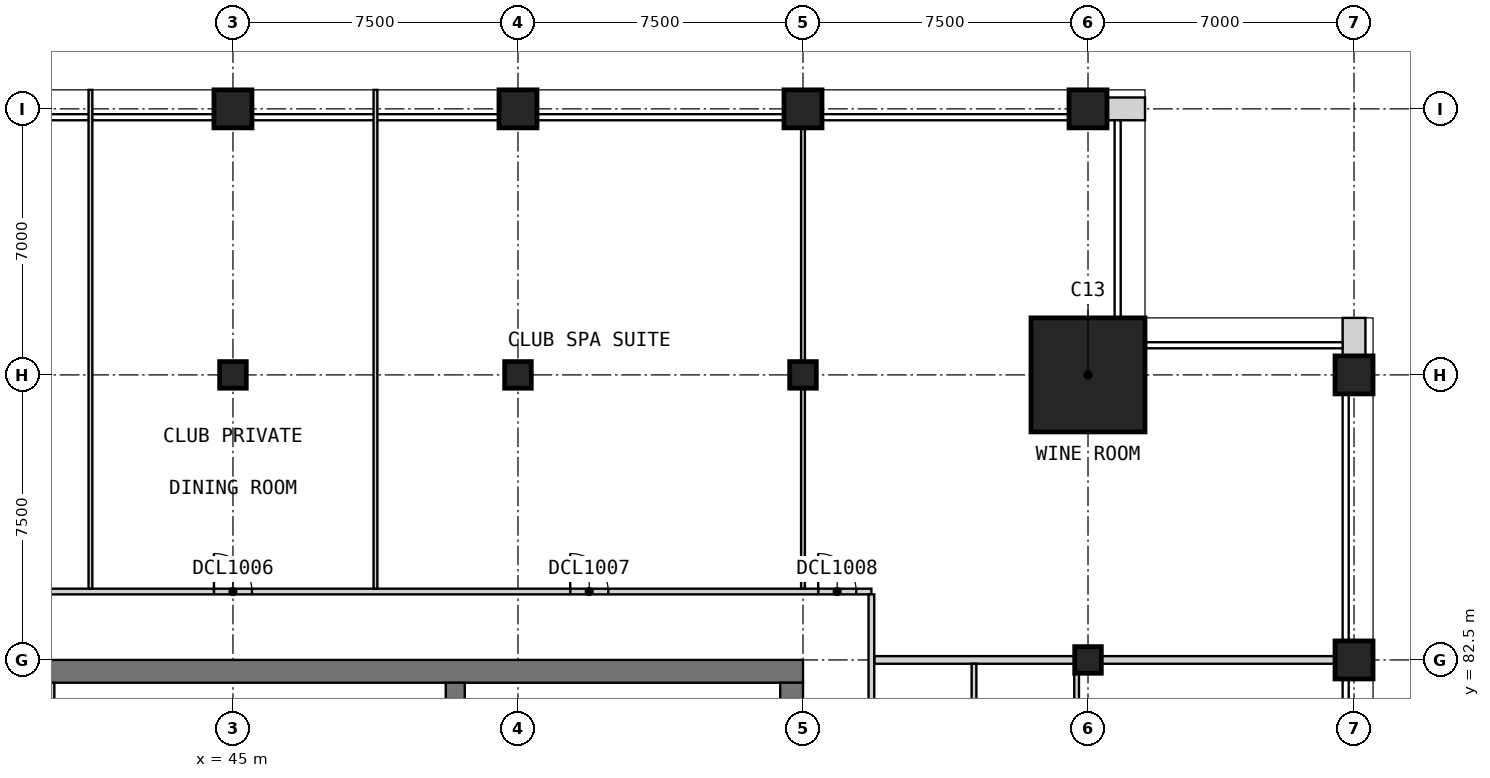
"""IFC4 building model, lengths in metres.
Left out: names, types, materials, properties, quantities, classifications, styles, units other than length and angle.
Written with IfcOpenShell. Run it as: python <this file> out.ifc"""

import sys

from ifc_helpers import new_model, si_unit, direction, frame, frame_2d, origin, origin_2d, place, context, subcontext, project, spatial, rectangle, extrude, element, fill, save


model = new_model("IFC4")
c1 = context("Model", 3, precision=1e-05, world=origin(), true_north=direction((0.0, 1.0)))
c2 = subcontext(c1, "Body", "Model", "MODEL_VIEW")
j1 = project(units=[si_unit("LENGTHUNIT", "METRE"), si_unit("PLANEANGLEUNIT", "RADIAN")], contexts=[c1])
p1 = place(None, origin())
s1 = spatial("IfcSite", under=j1, at=p1, CompositionType="ELEMENT")
p2 = place(p1, origin())
s2 = spatial("IfcBuilding", under=s1, at=p2, CompositionType="ELEMENT")
p3 = place(p2, frame((0.0, 0.0, 287.2)))
s3 = spatial("IfcBuildingStorey", under=s2, at=p3, CompositionType="ELEMENT", Elevation=287.2)
p4 = place(p3, frame((45.0, 90.0, 0.0), z_axis=(0.0, 0.0, 1.0), x_axis=(1.0, 0.0, 0.0)))
e1 = element("IfcColumn", 1, at=p4, inside=s3, PredefinedType="COLUMN", context=c2, shape_type="SweptSolid", body=[
    extrude(rectangle(XDim=0.7, YDim=0.7, at=origin_2d()), origin(), (0.0, 0.0, 1.0), 5.0),
])
p5 = place(p3, frame((45.0, 97.0, 0.0), z_axis=(0.0, 0.0, 1.0), x_axis=(1.0, 0.0, 0.0)))
e2 = element("IfcColumn", 2, at=p5, inside=s3, PredefinedType="COLUMN", context=c2, shape_type="SweptSolid", body=[
    extrude(rectangle(XDim=1.0, YDim=1.0, at=origin_2d()), origin(), (0.0, 0.0, 1.0), 5.0),
])
p6 = place(p3, frame((52.5, 90.0, 0.0), z_axis=(0.0, 0.0, 1.0), x_axis=(1.0, 0.0, 0.0)))
e3 = element("IfcColumn", 3, at=p6, inside=s3, PredefinedType="COLUMN", context=c2, shape_type="SweptSolid", body=[
    extrude(rectangle(XDim=0.7, YDim=0.7, at=origin_2d()), origin(), (0.0, 0.0, 1.0), 5.0),
])
p7 = place(p3, frame((52.5, 97.0, 0.0), z_axis=(0.0, 0.0, 1.0), x_axis=(1.0, 0.0, 0.0)))
e4 = element("IfcColumn", 4, at=p7, inside=s3, PredefinedType="COLUMN", context=c2, shape_type="SweptSolid", body=[
    extrude(rectangle(XDim=1.0, YDim=1.0, at=origin_2d()), origin(), (0.0, 0.0, 1.0), 5.0),
])
p8 = place(p3, frame((60.0, 90.0, 0.0), z_axis=(0.0, 0.0, 1.0), x_axis=(1.0, 0.0, 0.0)))
e5 = element("IfcColumn", 5, at=p8, inside=s3, PredefinedType="COLUMN", context=c2, shape_type="SweptSolid", body=[
    extrude(rectangle(XDim=0.7, YDim=0.7, at=origin_2d()), origin(), (0.0, 0.0, 1.0), 5.0),
])
p9 = place(p3, frame((60.0, 97.0, 0.0), z_axis=(0.0, 0.0, 1.0), x_axis=(1.0, 0.0, 0.0)))
e6 = element("IfcColumn", 6, at=p9, inside=s3, PredefinedType="COLUMN", context=c2, shape_type="SweptSolid", body=[
    extrude(rectangle(XDim=1.0, YDim=1.0, at=origin_2d()), origin(), (0.0, 0.0, 1.0), 5.0),
])
p10 = place(p3, frame((67.5, 82.5, 0.0), z_axis=(0.0, 0.0, 1.0), x_axis=(1.0, 0.0, 0.0)))
e7 = element("IfcColumn", 7, at=p10, inside=s3, PredefinedType="COLUMN", context=c2, shape_type="SweptSolid", body=[
    extrude(rectangle(XDim=0.7, YDim=0.7, at=origin_2d()), origin(), (0.0, 0.0, 1.0), 5.0),
])
for number, where, z_axis, x_axis in (
    (8, (67.5, 97.0, 0.0), (0.0, 0.0, 1.0), (1.0, 0.0, 0.0)),
    (9, (74.5, 82.5, 0.0), (0.0, 0.0, 1.0), (1.0, 0.0, 0.0)),
    (10, (74.5, 90.0, 0.0), (0.0, 0.0, 1.0), (1.0, 0.0, 0.0)),
):
    element("IfcColumn", number, at=place(p3, frame(where, z_axis=z_axis, x_axis=x_axis)), inside=s3, PredefinedType="COLUMN", context=c2, shape_type="SweptSolid", body=[
        extrude(rectangle(XDim=1.0, YDim=1.0, at=origin_2d()), origin(), (0.0, 0.0, 1.0), 5.0),
    ])
p11 = place(p3, frame((67.5, 90.0, 0.0), z_axis=(0.0, 0.0, 1.0), x_axis=(1.0, 0.0, 0.0)))
e11 = element("IfcColumn", 11, at=p11, inside=s3, PredefinedType="COLUMN", context=c2, shape_type="SweptSolid", body=[
    extrude(rectangle(XDim=3.0, YDim=3.0, at=origin_2d()), origin(), (0.0, 0.0, 1.0), 5.0),
])
p12 = place(p3, frame((30.0, 82.2, 0.0), z_axis=(0.0, 0.0, 1.0), x_axis=(1.0, 0.0, 0.0)))
e12 = element("IfcWall", 12, at=p12, inside=s3, PredefinedType="SHEAR", context=c2, shape_type="SweptSolid", body=[
    extrude(rectangle(XDim=30.0, YDim=0.6, at=frame_2d((15.0, 0.0))), origin(), (0.0, 0.0, 1.0), 5.0),
])
p13 = place(p3, frame((59.7, 60.6, 0.0), z_axis=(0.0, 0.0, 1.0), x_axis=(0.0, 1.0, 0.0)))
e13 = element("IfcWall", 13, at=p13, inside=s3, PredefinedType="SHEAR", context=c2, shape_type="SweptSolid", body=[
    extrude(rectangle(XDim=21.3, YDim=0.6, at=frame_2d((10.65, 0.0))), origin(), (0.0, 0.0, 1.0), 5.0),
])
p14 = place(p13, frame((14.9, 0.0, 0.0)))
e14 = element("IfcOpeningElement", 14, at=p14, cuts=e13, PredefinedType="OPENING", context=c2, shape_type="SweptSolid", body=[
    extrude(rectangle(XDim=1.8, YDim=2.1, at=frame_2d((0.9, 1.05))), frame((0.0, 0.31, 0.0), z_axis=(0.0, -1.0, 0.0), x_axis=(1.0, 0.0, 0.0)), (0.0, 0.0, 1.0), 0.62),
])
p15 = place(p3, frame((50.85, 78.3, 0.0), z_axis=(0.0, 0.0, 1.0), x_axis=(0.0, 1.0, 0.0)))
e15 = element("IfcWall", 15, at=p15, inside=s3, PredefinedType="SHEAR", context=c2, shape_type="SweptSolid", body=[
    extrude(rectangle(XDim=3.6, YDim=0.5, at=frame_2d((1.8, 0.0))), origin(), (0.0, 0.0, 1.0), 5.0),
])
for number, where, z_axis, x_axis in (
    (16, (74.5, 90.5, 0.0), (0.0, 0.0, 1.0), (0.0, 1.0, 0.0)),
    (17, (69.0, 97.0, 0.0), (0.0, 0.0, 1.0), (-1.0, 0.0, 0.0)),
):
    element("IfcWall", number, at=place(p3, frame(where, z_axis=z_axis, x_axis=x_axis)), inside=s3, PredefinedType="SOLIDWALL", context=c2, shape_type="SweptSolid", body=[
        extrude(rectangle(XDim=1.0, YDim=0.6, at=frame_2d((0.5, 0.0))), origin(), (0.0, 0.0, 1.0), 4.7),
    ])
p16 = place(p3, frame((40.2, 78.5, 0.0), z_axis=(0.0, 0.0, 1.0), x_axis=(0.0, 1.0, 0.0)))
e18 = element("IfcWall", 18, at=p16, inside=s3, PredefinedType="SOLIDWALL", context=c2, shape_type="SweptSolid", body=[
    extrude(rectangle(XDim=3.4, YDim=0.2, at=frame_2d((1.7, 0.0))), origin(), (0.0, 0.0, 1.0), 5.0),
])
p17 = place(p3, frame((61.875, 82.5, 0.0), z_axis=(0.0, 0.0, 1.0), x_axis=(1.0, 0.0, 0.0)))
e19 = element("IfcWall", 19, at=p17, inside=s3, PredefinedType="PARTITIONING", context=c2, shape_type="SweptSolid", body=[
    extrude(rectangle(XDim=13.125, YDim=0.2, at=frame_2d((6.562, 0.0))), origin(), (0.0, 0.0, 1.0), 4.7),
])
p18 = place(p3, frame((33.75, 84.3, 0.0), z_axis=(0.0, 0.0, 1.0), x_axis=(1.0, 0.0, 0.0)))
e20 = element("IfcWall", 20, at=p18, inside=s3, PredefinedType="PARTITIONING", context=c2, shape_type="SweptSolid", body=[
    extrude(rectangle(XDim=28.05, YDim=0.15, at=frame_2d((14.025, 0.0))), origin(), (0.0, 0.0, 1.0), 4.7),
])
p19 = place(p18, frame((3.25, 0.0, 0.0)))
e21 = element("IfcOpeningElement", 21, at=p19, cuts=e20, PredefinedType="OPENING", context=c2, shape_type="SweptSolid", body=[
    extrude(rectangle(XDim=1.0, YDim=2.1, at=frame_2d((0.5, 1.05))), frame((0.0, 0.085, 0.0), z_axis=(0.0, -1.0, 0.0), x_axis=(1.0, 0.0, 0.0)), (0.0, 0.0, 1.0), 0.17),
])
p20 = place(p18, frame((10.75, 0.0, 0.0)))
e22 = element("IfcOpeningElement", 22, at=p20, cuts=e20, PredefinedType="OPENING", context=c2, shape_type="SweptSolid", body=[
    extrude(rectangle(XDim=1.0, YDim=2.1, at=frame_2d((0.5, 1.05))), frame((0.0, 0.085, 0.0), z_axis=(0.0, -1.0, 0.0), x_axis=(1.0, 0.0, 0.0)), (0.0, 0.0, 1.0), 0.17),
])
p21 = place(p18, frame((20.125, 0.0, 0.0)))
e23 = element("IfcOpeningElement", 23, at=p21, cuts=e20, PredefinedType="OPENING", context=c2, shape_type="SweptSolid", body=[
    extrude(rectangle(XDim=1.0, YDim=2.1, at=frame_2d((0.5, 1.05))), frame((0.0, 0.085, 0.0), z_axis=(0.0, -1.0, 0.0), x_axis=(1.0, 0.0, 0.0)), (0.0, 0.0, 1.0), 0.17),
])
p22 = place(p18, frame((26.65, 0.0, 0.0)))
e24 = element("IfcOpeningElement", 24, at=p22, cuts=e20, PredefinedType="OPENING", context=c2, shape_type="SweptSolid", body=[
    extrude(rectangle(XDim=1.0, YDim=2.1, at=frame_2d((0.5, 1.05))), frame((0.0, 0.085, 0.0), z_axis=(0.0, -1.0, 0.0), x_axis=(1.0, 0.0, 0.0)), (0.0, 0.0, 1.0), 0.17),
])
p23 = place(p3, frame((61.8, 58.275, 0.0), z_axis=(0.0, 0.0, 1.0), x_axis=(0.0, 1.0, 0.0)))
e25 = element("IfcWall", 25, at=p23, inside=s3, PredefinedType="PARTITIONING", context=c2, shape_type="SweptSolid", body=[
    extrude(rectangle(XDim=25.95, YDim=0.15, at=frame_2d((12.975, 0.0))), origin(), (0.0, 0.0, 1.0), 4.7),
])
p24 = place(p23, frame((8.725, 0.0, 0.0)))
e26 = element("IfcOpeningElement", 26, at=p24, cuts=e25, PredefinedType="OPENING", context=c2, shape_type="SweptSolid", body=[
    extrude(rectangle(XDim=1.0, YDim=2.1, at=frame_2d((0.5, 1.05))), frame((0.0, 0.085, 0.0), z_axis=(0.0, -1.0, 0.0), x_axis=(1.0, 0.0, 0.0)), (0.0, 0.0, 1.0), 0.17),
])
p25 = place(p23, frame((18.15, 0.0, 0.0)))
e27 = element("IfcOpeningElement", 27, at=p25, cuts=e25, PredefinedType="OPENING", context=c2, shape_type="SweptSolid", body=[
    extrude(rectangle(XDim=0.9, YDim=2.1, at=frame_2d((0.45, 1.05))), frame((0.0, 0.085, 0.0), z_axis=(0.0, -1.0, 0.0), x_axis=(1.0, 0.0, 0.0)), (0.0, 0.0, 1.0), 0.17),
])
for number, where, z_axis, x_axis in (
    (28, (41.25, 84.375, 0.0), (0.0, 0.0, 1.0), (0.0, 1.0, 0.0)),
    (29, (48.75, 84.375, 0.0), (0.0, 0.0, 1.0), (0.0, 1.0, 0.0)),
    (30, (60.0, 84.375, 0.0), (0.0, 0.0, 1.0), (0.0, 1.0, 0.0)),
):
    element("IfcWall", number, at=place(p3, frame(where, z_axis=z_axis, x_axis=x_axis)), inside=s3, PredefinedType="PARTITIONING", context=c2, shape_type="SweptSolid", body=[
        extrude(rectangle(XDim=13.125, YDim=0.1, at=frame_2d((6.562, 0.0))), origin(), (0.0, 0.0, 1.0), 4.7),
    ])
for number, where, z_axis, x_axis in (
    (31, (64.5, 78.812, 0.0), (0.0, 0.0, 1.0), (0.0, 1.0, 0.0)),
    (32, (67.2, 78.812, 0.0), (0.0, 0.0, 1.0), (0.0, 1.0, 0.0)),
):
    element("IfcWall", number, at=place(p3, frame(where, z_axis=z_axis, x_axis=x_axis)), inside=s3, PredefinedType="PARTITIONING", context=c2, shape_type="SweptSolid", body=[
        extrude(rectangle(XDim=3.587, YDim=0.125, at=frame_2d((1.794, 0.0))), origin(), (0.0, 0.0, 1.0), 4.7),
    ])
p26 = place(p20, origin())
e33 = element("IfcDoor", 33, at=p26, inside=s3, OperationType="SINGLE_SWING_LEFT", PredefinedType="DOOR", context=c2, shape_type="SweptSolid", body=[
    extrude(rectangle(XDim=1.0, YDim=2.1, at=frame_2d((0.5, 1.05))), frame((0.0, 0.025, 0.0), z_axis=(0.0, -1.0, 0.0), x_axis=(1.0, 0.0, 0.0)), (0.0, 0.0, 1.0), 0.05),
])
fill(e22, e33)
p27 = place(p21, origin())
e34 = element("IfcDoor", 34, at=p27, inside=s3, OperationType="SINGLE_SWING_LEFT", PredefinedType="DOOR", context=c2, shape_type="SweptSolid", body=[
    extrude(rectangle(XDim=1.0, YDim=2.1, at=frame_2d((0.5, 1.05))), frame((0.0, 0.025, 0.0), z_axis=(0.0, -1.0, 0.0), x_axis=(1.0, 0.0, 0.0)), (0.0, 0.0, 1.0), 0.05),
])
fill(e23, e34)
p28 = place(p22, origin())
e35 = element("IfcDoor", 35, at=p28, inside=s3, OperationType="SINGLE_SWING_LEFT", PredefinedType="DOOR", context=c2, shape_type="SweptSolid", body=[
    extrude(rectangle(XDim=1.0, YDim=2.1, at=frame_2d((0.5, 1.05))), frame((0.0, 0.025, 0.0), z_axis=(0.0, -1.0, 0.0), x_axis=(1.0, 0.0, 0.0)), (0.0, 0.0, 1.0), 0.05),
])
fill(e24, e35)
save(model, sys.argv[1])
